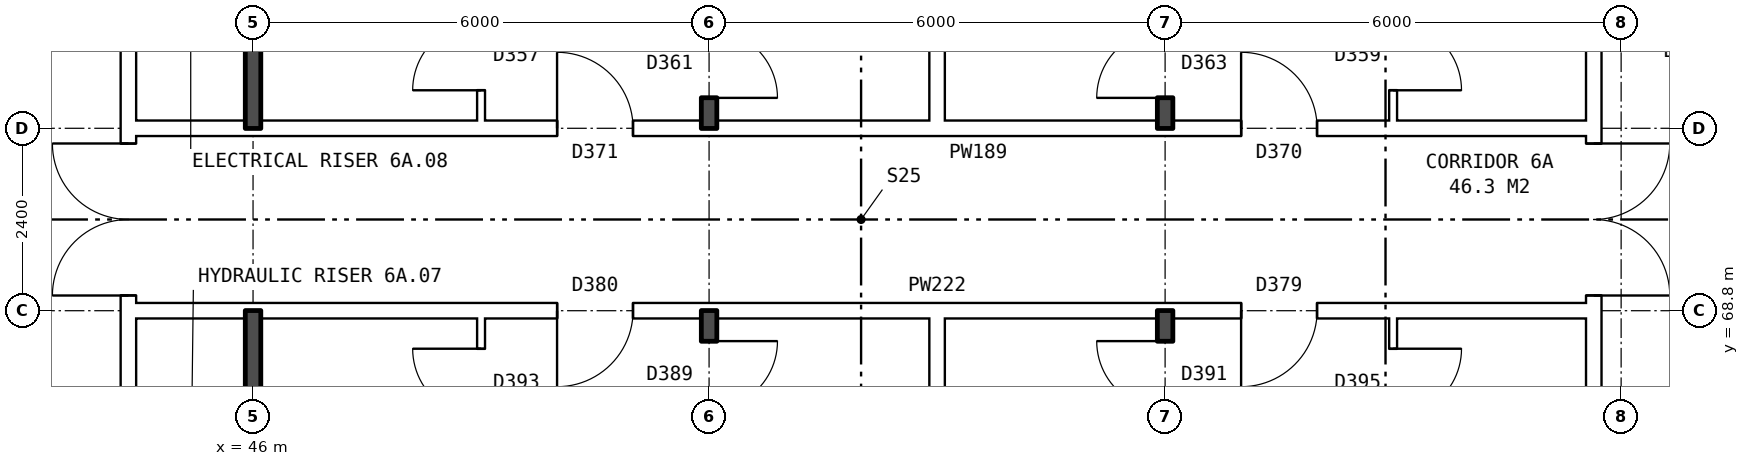
"""IFC4 building model, lengths in metres.
Left out: names, types, materials, properties, quantities, classifications, styles, units other than length and angle.
Written with IfcOpenShell. Run it as: python <this file> out.ifc"""

import sys

from ifc_helpers import new_model, si_unit, direction, frame, frame_2d, origin, place, context, subcontext, project, spatial, rectangle, extrude, element, fill, save


model = new_model("IFC4")
c1 = context("Model", 3, precision=1e-05, world=origin(), true_north=direction((0.0, 1.0)))
c2 = subcontext(c1, "Body", "Model", "MODEL_VIEW")
j1 = project(units=[si_unit("LENGTHUNIT", "METRE"), si_unit("PLANEANGLEUNIT", "RADIAN")], contexts=[c1])
p1 = place(None, origin())
s1 = spatial("IfcSite", under=j1, at=p1, CompositionType="ELEMENT")
p2 = place(p1, origin())
s2 = spatial("IfcBuilding", under=s1, at=p2, CompositionType="ELEMENT")
p3 = place(p2, frame((0.0, 0.0, 25.7)))
s3 = spatial("IfcBuildingStorey", under=s2, at=p3, CompositionType="ELEMENT", Elevation=25.7)
p4 = place(p3, frame((63.64, 63.9, 0.0), z_axis=(0.0, 0.0, 1.0), x_axis=(0.0, 1.0, 0.0)))
e1 = element("IfcWall", 1, at=p4, inside=s3, PredefinedType="PARTITIONING", context=c2, shape_type="SweptSolid", body=[
    extrude(rectangle(XDim=12.2, YDim=0.2, at=frame_2d((6.1, 0.0))), origin(), (0.0, 0.0, 1.0), 2.85),
])
p5 = place(p4, frame((5.1, 0.0, 0.0)))
e2 = element("IfcOpeningElement", 2, at=p5, cuts=e1, PredefinedType="OPENING", context=c2, shape_type="SweptSolid", body=[
    extrude(rectangle(XDim=2.0, YDim=2.1, at=frame_2d((1.0, 1.05))), frame((0.0, 0.11, 0.0), z_axis=(0.0, -1.0, 0.0), x_axis=(1.0, 0.0, 0.0)), (0.0, 0.0, 1.0), 0.22),
])
p6 = place(p3, frame((44.36, 63.9, 0.0), z_axis=(0.0, 0.0, 1.0), x_axis=(0.0, 1.0, 0.0)))
e3 = element("IfcWall", 3, at=p6, inside=s3, PredefinedType="PARTITIONING", context=c2, shape_type="SweptSolid", body=[
    extrude(rectangle(XDim=12.2, YDim=0.2, at=frame_2d((6.1, 0.0))), origin(), (0.0, 0.0, 1.0), 2.85),
])
p7 = place(p6, frame((5.1, 0.0, 0.0)))
e4 = element("IfcOpeningElement", 4, at=p7, cuts=e3, PredefinedType="OPENING", context=c2, shape_type="SweptSolid", body=[
    extrude(rectangle(XDim=2.0, YDim=2.1, at=frame_2d((1.0, 1.05))), frame((0.0, 0.11, 0.0), z_axis=(0.0, -1.0, 0.0), x_axis=(1.0, 0.0, 0.0)), (0.0, 0.0, 1.0), 0.22),
])
p8 = place(p3, frame((44.36, 68.8, 0.0), z_axis=(0.0, 0.0, 1.0), x_axis=(1.0, 0.0, 0.0)))
e5 = element("IfcWall", 5, at=p8, inside=s3, PredefinedType="PARTITIONING", context=c2, shape_type="SweptSolid", body=[
    extrude(rectangle(XDim=19.28, YDim=0.2, at=frame_2d((9.64, 0.0))), origin(), (0.0, 0.0, 1.0), 2.85),
])
p9 = place(p8, frame((14.64, 0.0, 0.0)))
e6 = element("IfcOpeningElement", 6, at=p9, cuts=e5, PredefinedType="OPENING", context=c2, shape_type="SweptSolid", body=[
    extrude(rectangle(XDim=1.0, YDim=2.1, at=frame_2d((0.5, 1.05))), frame((0.0, 0.11, 0.0), z_axis=(0.0, -1.0, 0.0), x_axis=(1.0, 0.0, 0.0)), (0.0, 0.0, 1.0), 0.22),
])
p10 = place(p8, frame((5.64, 0.0, 0.0)))
e7 = element("IfcOpeningElement", 7, at=p10, cuts=e5, PredefinedType="OPENING", context=c2, shape_type="SweptSolid", body=[
    extrude(rectangle(XDim=1.0, YDim=2.1, at=frame_2d((0.5, 1.05))), frame((0.0, 0.11, 0.0), z_axis=(0.0, -1.0, 0.0), x_axis=(1.0, 0.0, 0.0)), (0.0, 0.0, 1.0), 0.22),
])
p11 = place(p3, frame((44.36, 71.2, 0.0), z_axis=(0.0, 0.0, 1.0), x_axis=(1.0, 0.0, 0.0)))
e8 = element("IfcWall", 8, at=p11, inside=s3, PredefinedType="PARTITIONING", context=c2, shape_type="SweptSolid", body=[
    extrude(rectangle(XDim=19.28, YDim=0.2, at=frame_2d((9.64, 0.0))), origin(), (0.0, 0.0, 1.0), 2.85),
])
p12 = place(p11, frame((14.64, 0.0, 0.0)))
e9 = element("IfcOpeningElement", 9, at=p12, cuts=e8, PredefinedType="OPENING", context=c2, shape_type="SweptSolid", body=[
    extrude(rectangle(XDim=1.0, YDim=2.1, at=frame_2d((0.5, 1.05))), frame((0.0, 0.11, 0.0), z_axis=(0.0, -1.0, 0.0), x_axis=(1.0, 0.0, 0.0)), (0.0, 0.0, 1.0), 0.22),
])
p13 = place(p11, frame((5.64, 0.0, 0.0)))
e10 = element("IfcOpeningElement", 10, at=p13, cuts=e8, PredefinedType="OPENING", context=c2, shape_type="SweptSolid", body=[
    extrude(rectangle(XDim=1.0, YDim=2.1, at=frame_2d((0.5, 1.05))), frame((0.0, 0.11, 0.0), z_axis=(0.0, -1.0, 0.0), x_axis=(1.0, 0.0, 0.0)), (0.0, 0.0, 1.0), 0.22),
])
for number, where, z_axis, x_axis in (
    (11, (46.0, 63.8, 0.0), (0.0, 0.0, 1.0), (0.0, 1.0, 0.0)),
    (12, (46.0, 71.2, 0.0), (0.0, 0.0, 1.0), (0.0, 1.0, 0.0)),
):
    element("IfcWall", number, at=place(p3, frame(where, z_axis=z_axis, x_axis=x_axis)), inside=s3, PredefinedType="SOLIDWALL", context=c2, shape_type="SweptSolid", body=[
        extrude(rectangle(XDim=5.0, YDim=0.2, at=frame_2d((2.5, 0.0))), origin(), (0.0, 0.0, 1.0), 2.85),
    ])
p14 = place(p3, frame((49.0, 54.36, 0.0), z_axis=(0.0, 0.0, 1.0), x_axis=(0.0, 1.0, 0.0)))
e13 = element("IfcWall", 13, at=p14, inside=s3, PredefinedType="PARTITIONING", context=c2, shape_type="SweptSolid", body=[
    extrude(rectangle(XDim=14.34, YDim=0.1, at=frame_2d((7.17, 0.0))), origin(), (0.0, 0.0, 1.0), 2.85),
])
p15 = place(p14, frame((6.7, 0.0, 0.0)))
e14 = element("IfcOpeningElement", 14, at=p15, cuts=e13, PredefinedType="OPENING", context=c2, shape_type="SweptSolid", body=[
    extrude(rectangle(XDim=0.9, YDim=2.1, at=frame_2d((0.45, 1.05))), frame((0.0, 0.06, 0.0), z_axis=(0.0, -1.0, 0.0), x_axis=(1.0, 0.0, 0.0)), (0.0, 0.0, 1.0), 0.12),
])
p16 = place(p14, frame((13.04, 0.0, 0.0)))
e15 = element("IfcOpeningElement", 15, at=p16, cuts=e13, PredefinedType="OPENING", context=c2, shape_type="SweptSolid", body=[
    extrude(rectangle(XDim=0.9, YDim=2.1, at=frame_2d((0.45, 1.05))), frame((0.0, 0.06, 0.0), z_axis=(0.0, -1.0, 0.0), x_axis=(1.0, 0.0, 0.0)), (0.0, 0.0, 1.0), 0.12),
])
p17 = place(p3, frame((49.0, 71.3, 0.0), z_axis=(0.0, 0.0, 1.0), x_axis=(0.0, 1.0, 0.0)))
e16 = element("IfcWall", 16, at=p17, inside=s3, PredefinedType="PARTITIONING", context=c2, shape_type="SweptSolid", body=[
    extrude(rectangle(XDim=14.34, YDim=0.1, at=frame_2d((7.17, 0.0))), origin(), (0.0, 0.0, 1.0), 2.85),
])
p18 = place(p17, frame((9.24, 0.0, 0.0)))
e17 = element("IfcOpeningElement", 17, at=p18, cuts=e16, PredefinedType="OPENING", context=c2, shape_type="SweptSolid", body=[
    extrude(rectangle(XDim=0.9, YDim=2.1, at=frame_2d((0.45, 1.05))), frame((0.0, 0.06, 0.0), z_axis=(0.0, -1.0, 0.0), x_axis=(1.0, 0.0, 0.0)), (0.0, 0.0, 1.0), 0.12),
])
p19 = place(p17, frame((0.4, 0.0, 0.0)))
e18 = element("IfcOpeningElement", 18, at=p19, cuts=e16, PredefinedType="OPENING", context=c2, shape_type="SweptSolid", body=[
    extrude(rectangle(XDim=0.9, YDim=2.1, at=frame_2d((0.45, 1.05))), frame((0.0, 0.06, 0.0), z_axis=(0.0, -1.0, 0.0), x_axis=(1.0, 0.0, 0.0)), (0.0, 0.0, 1.0), 0.12),
])
p20 = place(p3, frame((52.0, 54.36, 0.0), z_axis=(0.0, 0.0, 1.0), x_axis=(0.0, 1.0, 0.0)))
e19 = element("IfcWall", 19, at=p20, inside=s3, PredefinedType="SOLIDWALL", context=c2, shape_type="SweptSolid", body=[
    extrude(rectangle(XDim=14.44, YDim=0.2, at=frame_2d((7.22, 0.0))), origin(), (0.0, 0.0, 1.0), 2.85),
])
p21 = place(p20, frame((6.7, 0.0, 0.0)))
e20 = element("IfcOpeningElement", 20, at=p21, cuts=e19, PredefinedType="OPENING", context=c2, shape_type="SweptSolid", body=[
    extrude(rectangle(XDim=0.9, YDim=2.1, at=frame_2d((0.45, 1.05))), frame((0.0, 0.11, 0.0), z_axis=(0.0, -1.0, 0.0), x_axis=(1.0, 0.0, 0.0)), (0.0, 0.0, 1.0), 0.22),
])
p22 = place(p20, frame((13.14, 0.0, 0.0)))
e21 = element("IfcOpeningElement", 21, at=p22, cuts=e19, PredefinedType="OPENING", context=c2, shape_type="SweptSolid", body=[
    extrude(rectangle(XDim=0.9, YDim=2.1, at=frame_2d((0.45, 1.05))), frame((0.0, 0.11, 0.0), z_axis=(0.0, -1.0, 0.0), x_axis=(1.0, 0.0, 0.0)), (0.0, 0.0, 1.0), 0.22),
])
p23 = place(p3, frame((52.0, 71.2, 0.0), z_axis=(0.0, 0.0, 1.0), x_axis=(0.0, 1.0, 0.0)))
e22 = element("IfcWall", 22, at=p23, inside=s3, PredefinedType="SOLIDWALL", context=c2, shape_type="SweptSolid", body=[
    extrude(rectangle(XDim=14.44, YDim=0.2, at=frame_2d((7.22, 0.0))), origin(), (0.0, 0.0, 1.0), 2.85),
])
p24 = place(p23, frame((9.34, 0.0, 0.0)))
e23 = element("IfcOpeningElement", 23, at=p24, cuts=e22, PredefinedType="OPENING", context=c2, shape_type="SweptSolid", body=[
    extrude(rectangle(XDim=0.9, YDim=2.1, at=frame_2d((0.45, 1.05))), frame((0.0, 0.11, 0.0), z_axis=(0.0, -1.0, 0.0), x_axis=(1.0, 0.0, 0.0)), (0.0, 0.0, 1.0), 0.22),
])
p25 = place(p23, frame((0.4, 0.0, 0.0)))
e24 = element("IfcOpeningElement", 24, at=p25, cuts=e22, PredefinedType="OPENING", context=c2, shape_type="SweptSolid", body=[
    extrude(rectangle(XDim=0.9, YDim=2.1, at=frame_2d((0.45, 1.05))), frame((0.0, 0.11, 0.0), z_axis=(0.0, -1.0, 0.0), x_axis=(1.0, 0.0, 0.0)), (0.0, 0.0, 1.0), 0.22),
])
for number, where, z_axis, x_axis in (
    (25, (55.0, 54.36, 0.0), (0.0, 0.0, 1.0), (0.0, 1.0, 0.0)),
    (26, (55.0, 71.3, 0.0), (0.0, 0.0, 1.0), (0.0, 1.0, 0.0)),
):
    element("IfcWall", number, at=place(p3, frame(where, z_axis=z_axis, x_axis=x_axis)), inside=s3, PredefinedType="PARTITIONING", context=c2, shape_type="SweptSolid", body=[
        extrude(rectangle(XDim=14.34, YDim=0.2, at=frame_2d((7.17, 0.0))), origin(), (0.0, 0.0, 1.0), 2.85),
    ])
p26 = place(p3, frame((58.0, 54.36, 0.0), z_axis=(0.0, 0.0, 1.0), x_axis=(0.0, 1.0, 0.0)))
e27 = element("IfcWall", 27, at=p26, inside=s3, PredefinedType="SOLIDWALL", context=c2, shape_type="SweptSolid", body=[
    extrude(rectangle(XDim=14.44, YDim=0.2, at=frame_2d((7.22, 0.0))), origin(), (0.0, 0.0, 1.0), 2.85),
])
p27 = place(p26, frame((7.7, 0.0, 0.0)))
e28 = element("IfcOpeningElement", 28, at=p27, cuts=e27, PredefinedType="OPENING", context=c2, shape_type="SweptSolid", body=[
    extrude(rectangle(XDim=0.9, YDim=2.1, at=frame_2d((0.45, 1.05))), frame((0.0, 0.11, 0.0), z_axis=(0.0, -1.0, 0.0), x_axis=(1.0, 0.0, 0.0)), (0.0, 0.0, 1.0), 0.22),
])
p28 = place(p26, frame((13.14, 0.0, 0.0)))
e29 = element("IfcOpeningElement", 29, at=p28, cuts=e27, PredefinedType="OPENING", context=c2, shape_type="SweptSolid", body=[
    extrude(rectangle(XDim=0.9, YDim=2.1, at=frame_2d((0.45, 1.05))), frame((0.0, 0.11, 0.0), z_axis=(0.0, -1.0, 0.0), x_axis=(1.0, 0.0, 0.0)), (0.0, 0.0, 1.0), 0.22),
])
p29 = place(p3, frame((58.0, 71.2, 0.0), z_axis=(0.0, 0.0, 1.0), x_axis=(0.0, 1.0, 0.0)))
e30 = element("IfcWall", 30, at=p29, inside=s3, PredefinedType="SOLIDWALL", context=c2, shape_type="SweptSolid", body=[
    extrude(rectangle(XDim=14.44, YDim=0.2, at=frame_2d((7.22, 0.0))), origin(), (0.0, 0.0, 1.0), 2.85),
])
p30 = place(p29, frame((9.34, 0.0, 0.0)))
e31 = element("IfcOpeningElement", 31, at=p30, cuts=e30, PredefinedType="OPENING", context=c2, shape_type="SweptSolid", body=[
    extrude(rectangle(XDim=0.9, YDim=2.1, at=frame_2d((0.45, 1.05))), frame((0.0, 0.11, 0.0), z_axis=(0.0, -1.0, 0.0), x_axis=(1.0, 0.0, 0.0)), (0.0, 0.0, 1.0), 0.22),
])
p31 = place(p29, frame((0.4, 0.0, 0.0)))
e32 = element("IfcOpeningElement", 32, at=p31, cuts=e30, PredefinedType="OPENING", context=c2, shape_type="SweptSolid", body=[
    extrude(rectangle(XDim=0.9, YDim=2.1, at=frame_2d((0.45, 1.05))), frame((0.0, 0.11, 0.0), z_axis=(0.0, -1.0, 0.0), x_axis=(1.0, 0.0, 0.0)), (0.0, 0.0, 1.0), 0.22),
])
p32 = place(p3, frame((61.0, 54.36, 0.0), z_axis=(0.0, 0.0, 1.0), x_axis=(0.0, 1.0, 0.0)))
e33 = element("IfcWall", 33, at=p32, inside=s3, PredefinedType="PARTITIONING", context=c2, shape_type="SweptSolid", body=[
    extrude(rectangle(XDim=14.34, YDim=0.1, at=frame_2d((7.17, 0.0))), origin(), (0.0, 0.0, 1.0), 2.85),
])
p33 = place(p32, frame((7.7, 0.0, 0.0)))
e34 = element("IfcOpeningElement", 34, at=p33, cuts=e33, PredefinedType="OPENING", context=c2, shape_type="SweptSolid", body=[
    extrude(rectangle(XDim=0.9, YDim=2.1, at=frame_2d((0.45, 1.05))), frame((0.0, 0.06, 0.0), z_axis=(0.0, -1.0, 0.0), x_axis=(1.0, 0.0, 0.0)), (0.0, 0.0, 1.0), 0.12),
])
p34 = place(p32, frame((13.04, 0.0, 0.0)))
e35 = element("IfcOpeningElement", 35, at=p34, cuts=e33, PredefinedType="OPENING", context=c2, shape_type="SweptSolid", body=[
    extrude(rectangle(XDim=0.9, YDim=2.1, at=frame_2d((0.45, 1.05))), frame((0.0, 0.06, 0.0), z_axis=(0.0, -1.0, 0.0), x_axis=(1.0, 0.0, 0.0)), (0.0, 0.0, 1.0), 0.12),
])
p35 = place(p3, frame((61.0, 71.3, 0.0), z_axis=(0.0, 0.0, 1.0), x_axis=(0.0, 1.0, 0.0)))
e36 = element("IfcWall", 36, at=p35, inside=s3, PredefinedType="PARTITIONING", context=c2, shape_type="SweptSolid", body=[
    extrude(rectangle(XDim=14.34, YDim=0.1, at=frame_2d((7.17, 0.0))), origin(), (0.0, 0.0, 1.0), 2.85),
])
p36 = place(p35, frame((9.24, 0.0, 0.0)))
e37 = element("IfcOpeningElement", 37, at=p36, cuts=e36, PredefinedType="OPENING", context=c2, shape_type="SweptSolid", body=[
    extrude(rectangle(XDim=0.9, YDim=2.1, at=frame_2d((0.45, 1.05))), frame((0.0, 0.06, 0.0), z_axis=(0.0, -1.0, 0.0), x_axis=(1.0, 0.0, 0.0)), (0.0, 0.0, 1.0), 0.12),
])
p37 = place(p35, frame((0.4, 0.0, 0.0)))
e38 = element("IfcOpeningElement", 38, at=p37, cuts=e36, PredefinedType="OPENING", context=c2, shape_type="SweptSolid", body=[
    extrude(rectangle(XDim=0.9, YDim=2.1, at=frame_2d((0.45, 1.05))), frame((0.0, 0.06, 0.0), z_axis=(0.0, -1.0, 0.0), x_axis=(1.0, 0.0, 0.0)), (0.0, 0.0, 1.0), 0.12),
])
p38 = place(p5, frame((2.0, 0.0, 0.0), z_axis=(0.0, 0.0, 1.0), x_axis=(-1.0, 0.0, 0.0)))
e39 = element("IfcDoor", 39, at=p38, inside=s3, OperationType="DOUBLE_DOOR_SINGLE_SWING", PredefinedType="DOOR", context=c2, shape_type="SweptSolid", body=[
    extrude(rectangle(XDim=2.0, YDim=2.1, at=frame_2d((1.0, 1.05))), frame((0.0, 0.025, 0.0), z_axis=(0.0, -1.0, 0.0), x_axis=(1.0, 0.0, 0.0)), (0.0, 0.0, 1.0), 0.05),
])
fill(e2, e39)
p39 = place(p7, origin())
e40 = element("IfcDoor", 40, at=p39, inside=s3, OperationType="DOUBLE_DOOR_SINGLE_SWING", PredefinedType="DOOR", context=c2, shape_type="SweptSolid", body=[
    extrude(rectangle(XDim=2.0, YDim=2.1, at=frame_2d((1.0, 1.05))), frame((0.0, 0.025, 0.0), z_axis=(0.0, -1.0, 0.0), x_axis=(1.0, 0.0, 0.0)), (0.0, 0.0, 1.0), 0.05),
])
fill(e4, e40)
p40 = place(p9, frame((1.0, 0.0, 0.0), z_axis=(0.0, 0.0, 1.0), x_axis=(-1.0, 0.0, 0.0)))
e41 = element("IfcDoor", 41, at=p40, inside=s3, OperationType="SINGLE_SWING_RIGHT", PredefinedType="DOOR", context=c2, shape_type="SweptSolid", body=[
    extrude(rectangle(XDim=1.0, YDim=2.1, at=frame_2d((0.5, 1.05))), frame((0.0, 0.025, 0.0), z_axis=(0.0, -1.0, 0.0), x_axis=(1.0, 0.0, 0.0)), (0.0, 0.0, 1.0), 0.05),
])
fill(e6, e41)
p41 = place(p34, frame((0.9, 0.0, 0.0), z_axis=(0.0, 0.0, 1.0), x_axis=(-1.0, 0.0, 0.0)))
e42 = element("IfcDoor", 42, at=p41, inside=s3, OperationType="SINGLE_SWING_LEFT", PredefinedType="DOOR", context=c2, shape_type="SweptSolid", body=[
    extrude(rectangle(XDim=0.9, YDim=2.1, at=frame_2d((0.45, 1.05))), frame((0.0, 0.025, 0.0), z_axis=(0.0, -1.0, 0.0), x_axis=(1.0, 0.0, 0.0)), (0.0, 0.0, 1.0), 0.05),
])
fill(e35, e42)
p42 = place(p28, origin())
e43 = element("IfcDoor", 43, at=p42, inside=s3, OperationType="SINGLE_SWING_RIGHT", PredefinedType="DOOR", context=c2, shape_type="SweptSolid", body=[
    extrude(rectangle(XDim=0.9, YDim=2.1, at=frame_2d((0.45, 1.05))), frame((0.0, 0.025, 0.0), z_axis=(0.0, -1.0, 0.0), x_axis=(1.0, 0.0, 0.0)), (0.0, 0.0, 1.0), 0.05),
])
fill(e29, e43)
p43 = place(p10, frame((1.0, 0.0, 0.0), z_axis=(0.0, 0.0, 1.0), x_axis=(-1.0, 0.0, 0.0)))
e44 = element("IfcDoor", 44, at=p43, inside=s3, OperationType="SINGLE_SWING_RIGHT", PredefinedType="DOOR", context=c2, shape_type="SweptSolid", body=[
    extrude(rectangle(XDim=1.0, YDim=2.1, at=frame_2d((0.5, 1.05))), frame((0.0, 0.025, 0.0), z_axis=(0.0, -1.0, 0.0), x_axis=(1.0, 0.0, 0.0)), (0.0, 0.0, 1.0), 0.05),
])
fill(e7, e44)
p44 = place(p22, frame((0.9, 0.0, 0.0), z_axis=(0.0, 0.0, 1.0), x_axis=(-1.0, 0.0, 0.0)))
e45 = element("IfcDoor", 45, at=p44, inside=s3, OperationType="SINGLE_SWING_LEFT", PredefinedType="DOOR", context=c2, shape_type="SweptSolid", body=[
    extrude(rectangle(XDim=0.9, YDim=2.1, at=frame_2d((0.45, 1.05))), frame((0.0, 0.025, 0.0), z_axis=(0.0, -1.0, 0.0), x_axis=(1.0, 0.0, 0.0)), (0.0, 0.0, 1.0), 0.05),
])
fill(e21, e45)
p45 = place(p16, origin())
e46 = element("IfcDoor", 46, at=p45, inside=s3, OperationType="SINGLE_SWING_RIGHT", PredefinedType="DOOR", context=c2, shape_type="SweptSolid", body=[
    extrude(rectangle(XDim=0.9, YDim=2.1, at=frame_2d((0.45, 1.05))), frame((0.0, 0.025, 0.0), z_axis=(0.0, -1.0, 0.0), x_axis=(1.0, 0.0, 0.0)), (0.0, 0.0, 1.0), 0.05),
])
fill(e15, e46)
p46 = place(p12, origin())
e47 = element("IfcDoor", 47, at=p46, inside=s3, OperationType="SINGLE_SWING_LEFT", PredefinedType="DOOR", context=c2, shape_type="SweptSolid", body=[
    extrude(rectangle(XDim=1.0, YDim=2.1, at=frame_2d((0.5, 1.05))), frame((0.0, 0.025, 0.0), z_axis=(0.0, -1.0, 0.0), x_axis=(1.0, 0.0, 0.0)), (0.0, 0.0, 1.0), 0.05),
])
fill(e9, e47)
p47 = place(p37, frame((0.9, 0.0, 0.0), z_axis=(0.0, 0.0, 1.0), x_axis=(-1.0, 0.0, 0.0)))
e48 = element("IfcDoor", 48, at=p47, inside=s3, OperationType="SINGLE_SWING_RIGHT", PredefinedType="DOOR", context=c2, shape_type="SweptSolid", body=[
    extrude(rectangle(XDim=0.9, YDim=2.1, at=frame_2d((0.45, 1.05))), frame((0.0, 0.025, 0.0), z_axis=(0.0, -1.0, 0.0), x_axis=(1.0, 0.0, 0.0)), (0.0, 0.0, 1.0), 0.05),
])
fill(e38, e48)
p48 = place(p31, origin())
e49 = element("IfcDoor", 49, at=p48, inside=s3, OperationType="SINGLE_SWING_LEFT", PredefinedType="DOOR", context=c2, shape_type="SweptSolid", body=[
    extrude(rectangle(XDim=0.9, YDim=2.1, at=frame_2d((0.45, 1.05))), frame((0.0, 0.025, 0.0), z_axis=(0.0, -1.0, 0.0), x_axis=(1.0, 0.0, 0.0)), (0.0, 0.0, 1.0), 0.05),
])
fill(e32, e49)
p49 = place(p13, origin())
e50 = element("IfcDoor", 50, at=p49, inside=s3, OperationType="SINGLE_SWING_LEFT", PredefinedType="DOOR", context=c2, shape_type="SweptSolid", body=[
    extrude(rectangle(XDim=1.0, YDim=2.1, at=frame_2d((0.5, 1.05))), frame((0.0, 0.025, 0.0), z_axis=(0.0, -1.0, 0.0), x_axis=(1.0, 0.0, 0.0)), (0.0, 0.0, 1.0), 0.05),
])
fill(e10, e50)
p50 = place(p25, frame((0.9, 0.0, 0.0), z_axis=(0.0, 0.0, 1.0), x_axis=(-1.0, 0.0, 0.0)))
e51 = element("IfcDoor", 51, at=p50, inside=s3, OperationType="SINGLE_SWING_RIGHT", PredefinedType="DOOR", context=c2, shape_type="SweptSolid", body=[
    extrude(rectangle(XDim=0.9, YDim=2.1, at=frame_2d((0.45, 1.05))), frame((0.0, 0.025, 0.0), z_axis=(0.0, -1.0, 0.0), x_axis=(1.0, 0.0, 0.0)), (0.0, 0.0, 1.0), 0.05),
])
fill(e24, e51)
p51 = place(p19, origin())
e52 = element("IfcDoor", 52, at=p51, inside=s3, OperationType="SINGLE_SWING_LEFT", PredefinedType="DOOR", context=c2, shape_type="SweptSolid", body=[
    extrude(rectangle(XDim=0.9, YDim=2.1, at=frame_2d((0.45, 1.05))), frame((0.0, 0.025, 0.0), z_axis=(0.0, -1.0, 0.0), x_axis=(1.0, 0.0, 0.0)), (0.0, 0.0, 1.0), 0.05),
])
fill(e18, e52)
save(model, sys.argv[1])
